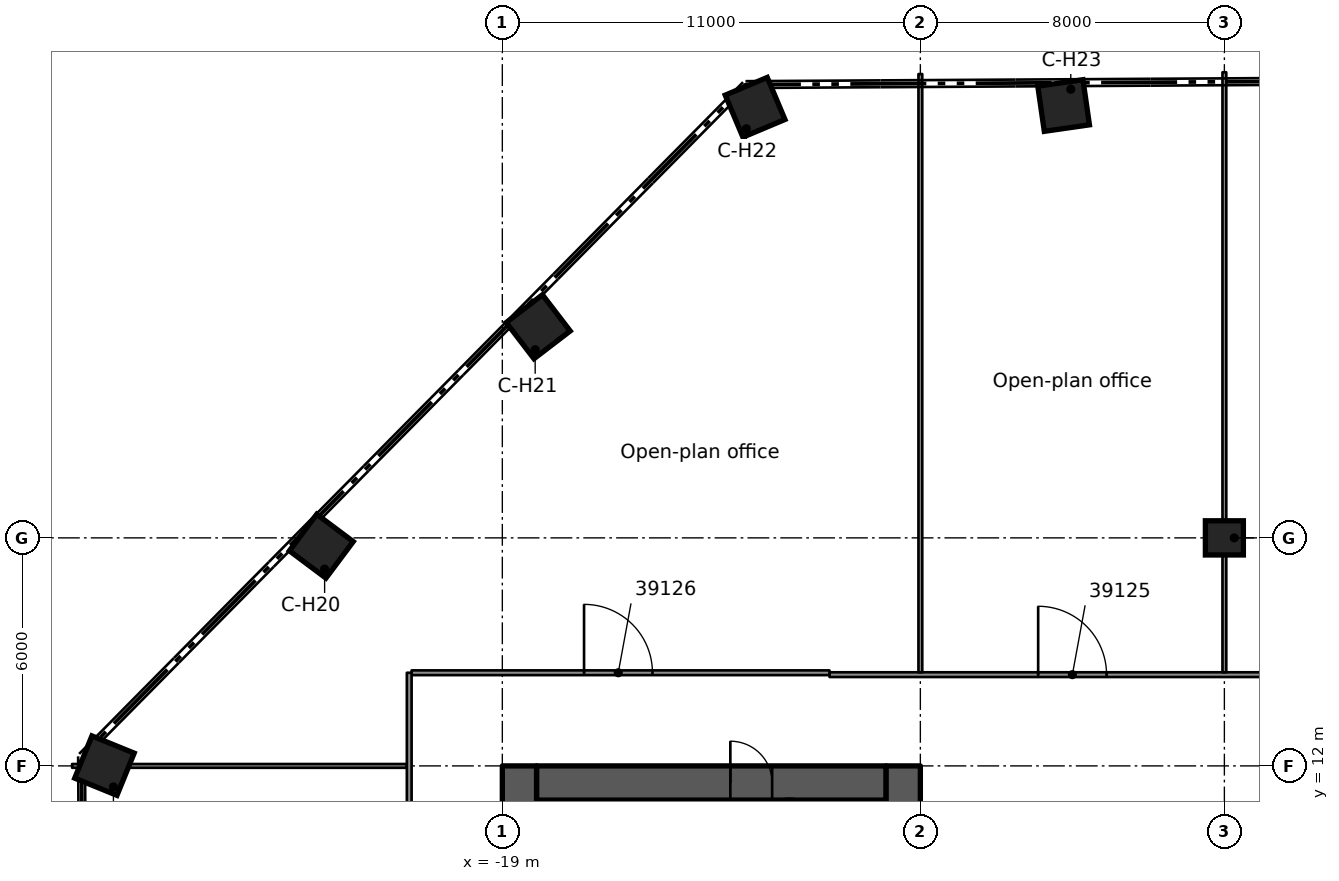
"""IFC4 building model, lengths in metres.
Left out: names, types, materials, properties, quantities, classifications, styles, units other than length and angle.
Written with IfcOpenShell. Run it as: python <this file> out.ifc"""

import sys

from ifc_helpers import new_model, si_unit, direction, frame, frame_2d, origin, origin_2d, place, context, subcontext, project, spatial, rectangle, extrude, element, fill, save


model = new_model("IFC4")
c1 = context("Model", 3, precision=1e-05, world=origin(), true_north=direction((0.0, 1.0)))
c2 = subcontext(c1, "Body", "Model", "MODEL_VIEW")
j1 = project(units=[si_unit("LENGTHUNIT", "METRE"), si_unit("PLANEANGLEUNIT", "RADIAN")], contexts=[c1])
p1 = place(None, origin())
s1 = spatial("IfcSite", under=j1, at=p1, CompositionType="ELEMENT")
p2 = place(p1, origin())
s2 = spatial("IfcBuilding", under=s1, at=p2, CompositionType="ELEMENT")
p3 = place(p2, frame((0.0, 0.0, 192.1)))
s3 = spatial("IfcBuildingStorey", under=s2, at=p3, CompositionType="ELEMENT", Elevation=192.1)
p4 = place(p3, frame((-18.1, 11.55, 0.0), z_axis=(0.0, 0.0, 1.0), x_axis=(1.0, 0.0, 0.0)))
e1 = element("IfcWall", 1, at=p4, inside=s3, PredefinedType="SHEAR", context=c2, shape_type="SweptSolid", body=[
    extrude(rectangle(XDim=9.2, YDim=0.9, at=frame_2d((4.6, 0.0))), origin(), (0.0, 0.0, 1.0), 3.5),
])
p5 = place(p4, frame((5.1, 0.0, 0.0)))
e2 = element("IfcOpeningElement", 2, at=p5, cuts=e1, PredefinedType="OPENING", context=c2, shape_type="SweptSolid", body=[
    extrude(rectangle(XDim=1.1, YDim=2.1, at=frame_2d((0.55, 1.05))), frame((0.0, 0.46, 0.0), z_axis=(0.0, -1.0, 0.0), x_axis=(1.0, 0.0, 0.0)), (0.0, 0.0, 1.0), 0.92),
])
p6 = place(p3, frame((-18.55, -12.0, 0.0), z_axis=(0.0, 0.0, 1.0), x_axis=(0.0, 1.0, 0.0)))
e3 = element("IfcWall", 3, at=p6, inside=s3, PredefinedType="SHEAR", context=c2, shape_type="SweptSolid", body=[
    extrude(rectangle(XDim=24.0, YDim=0.9, at=frame_2d((12.0, 0.0))), origin(), (0.0, 0.0, 1.0), 3.5),
])
p7 = place(p6, frame((10.1, 0.0, 0.0)))
e4 = element("IfcOpeningElement", 4, at=p7, cuts=e3, PredefinedType="OPENING", context=c2, shape_type="SweptSolid", body=[
    extrude(rectangle(XDim=1.8, YDim=2.1, at=frame_2d((0.9, 1.05))), frame((0.0, 0.46, 0.0), z_axis=(0.0, -1.0, 0.0), x_axis=(1.0, 0.0, 0.0)), (0.0, 0.0, 1.0), 0.92),
])
p8 = place(p3, frame((-8.45, -12.0, 0.0), z_axis=(0.0, 0.0, 1.0), x_axis=(0.0, 1.0, 0.0)))
e5 = element("IfcWall", 5, at=p8, inside=s3, PredefinedType="SHEAR", context=c2, shape_type="SweptSolid", body=[
    extrude(rectangle(XDim=24.0, YDim=0.9, at=frame_2d((12.0, 0.0))), origin(), (0.0, 0.0, 1.0), 3.5),
])
p9 = place(p8, frame((9.6, 0.0, 0.0)))
e6 = element("IfcOpeningElement", 6, at=p9, cuts=e5, PredefinedType="OPENING", context=c2, shape_type="SweptSolid", body=[
    extrude(rectangle(XDim=1.8, YDim=2.1, at=frame_2d((0.9, 1.05))), frame((0.0, 0.46, 0.0), z_axis=(0.0, -1.0, 0.0), x_axis=(1.0, 0.0, 0.0)), (0.0, 0.0, 1.0), 0.92),
])
p10 = place(p8, frame((19.65, 0.0, 0.0)))
e7 = element("IfcOpeningElement", 7, at=p10, cuts=e5, PredefinedType="OPENING", context=c2, shape_type="SweptSolid", body=[
    extrude(rectangle(XDim=1.1, YDim=2.1, at=frame_2d((0.55, 1.05))), frame((0.0, 0.46, 0.0), z_axis=(0.0, -1.0, 0.0), x_axis=(1.0, 0.0, 0.0)), (0.0, 0.0, 1.0), 0.92),
])
p11 = place(p8, frame((2.2, 0.0, 0.0)))
e8 = element("IfcOpeningElement", 8, at=p11, cuts=e5, PredefinedType="OPENING", context=c2, shape_type="SweptSolid", body=[
    extrude(rectangle(XDim=0.8, YDim=2.1, at=frame_2d((0.4, 1.05))), frame((0.0, 0.46, 0.0), z_axis=(0.0, -1.0, 0.0), x_axis=(1.0, 0.0, 0.0)), (0.0, 0.0, 1.0), 0.92),
])
for number, where, z_axis, x_axis in (
    (9, (-29.47, 12.007, 0.0), (0.0, 0.0, 1.0), (-0.926, 0.377, 0.0)),
    (10, (-23.763, 17.781, 0.0), (0.0, 0.0, 1.0), (-0.801, 0.599, 0.0)),
    (11, (-18.056, 23.555, 0.0), (0.0, 0.0, 1.0), (-0.608, 0.794, 0.0)),
    (12, (-12.349, 29.329, 0.0), (0.0, 0.0, 1.0), (-0.388, 0.922, 0.0)),
    (13, (-4.23, 29.376, 0.0), (0.0, 0.0, 1.0), (-0.143, 0.99, 0.0)),
):
    element("IfcColumn", number, at=place(p3, frame(where, z_axis=z_axis, x_axis=x_axis)), inside=s3, PredefinedType="COLUMN", context=c2, shape_type="SweptSolid", body=[
        extrude(rectangle(XDim=1.2, YDim=1.2, at=origin_2d()), origin(), (0.0, 0.0, 1.0), 3.5),
    ])
p12 = place(p3, frame((0.0, 18.0, 0.0), z_axis=(0.0, 0.0, 1.0), x_axis=(1.0, 0.0, 0.0)))
e14 = element("IfcColumn", 14, at=p12, inside=s3, PredefinedType="COLUMN", context=c2, shape_type="SweptSolid", body=[
    extrude(rectangle(XDim=1.0, YDim=0.9, at=origin_2d()), origin(), (0.0, 0.0, 1.0), 3.5),
])
p13 = place(p3, frame((-11.44, 6.975, 0.0), z_axis=(0.0, 0.0, 1.0), x_axis=(0.0, 1.0, 0.0)))
e15 = element("IfcWall", 15, at=p13, inside=s3, PredefinedType="SOLIDWALL", context=c2, shape_type="SweptSolid", body=[
    extrude(rectangle(XDim=4.125, YDim=0.2, at=frame_2d((2.062, 0.0))), origin(), (0.0, 0.0, 1.0), 3.08),
])
p14 = place(p13, frame((2.1, 0.0, 0.0)))
e16 = element("IfcOpeningElement", 16, at=p14, cuts=e15, PredefinedType="OPENING", context=c2, shape_type="SweptSolid", body=[
    extrude(rectangle(XDim=1.1, YDim=2.1, at=frame_2d((0.55, 1.05))), frame((0.0, 0.11, 0.0), z_axis=(0.0, -1.0, 0.0), x_axis=(1.0, 0.0, 0.0)), (0.0, 0.0, 1.0), 0.22),
])
p15 = place(p3, frame((-30.321, 12.0, 0.0), z_axis=(0.0, 0.0, 1.0), x_axis=(1.0, 0.0, 0.0)))
e17 = element("IfcWall", 17, at=p15, inside=s3, PredefinedType="PARTITIONING", context=c2, shape_type="SweptSolid", body=[
    extrude(rectangle(XDim=8.809, YDim=0.1, at=frame_2d((4.405, 0.0))), origin(), (0.0, 0.0, 1.0), 3.06),
])
p16 = place(p3, frame((-10.39, 14.401, 0.0), z_axis=(0.0, 0.0, 1.0), x_axis=(1.0, 0.0, 0.0)))
e18 = element("IfcWall", 18, at=p16, inside=s3, PredefinedType="PARTITIONING", context=c2, shape_type="SweptSolid", body=[
    extrude(rectangle(XDim=20.781, YDim=0.125, at=frame_2d((10.391, 0.0))), origin(), (0.0, 0.0, 1.0), 3.06),
])
p17 = place(p16, frame((18.99, 0.0, 0.0)))
e19 = element("IfcOpeningElement", 19, at=p17, cuts=e18, PredefinedType="OPENING", context=c2, shape_type="SweptSolid", body=[
    extrude(rectangle(XDim=1.1, YDim=2.1, at=frame_2d((0.55, 1.05))), frame((0.0, 0.073, 0.0), z_axis=(0.0, -1.0, 0.0), x_axis=(1.0, 0.0, 0.0)), (0.0, 0.0, 1.0), 0.145),
])
p18 = place(p16, frame((13.49, 0.0, 0.0)))
e20 = element("IfcOpeningElement", 20, at=p18, cuts=e18, PredefinedType="OPENING", context=c2, shape_type="SweptSolid", body=[
    extrude(rectangle(XDim=1.8, YDim=2.1, at=frame_2d((0.9, 1.05))), frame((0.0, 0.073, 0.0), z_axis=(0.0, -1.0, 0.0), x_axis=(1.0, 0.0, 0.0)), (0.0, 0.0, 1.0), 0.145),
])
p19 = place(p16, frame((5.49, 0.0, 0.0)))
e21 = element("IfcOpeningElement", 21, at=p19, cuts=e18, PredefinedType="OPENING", context=c2, shape_type="SweptSolid", body=[
    extrude(rectangle(XDim=1.8, YDim=2.1, at=frame_2d((0.9, 1.05))), frame((0.0, 0.073, 0.0), z_axis=(0.0, -1.0, 0.0), x_axis=(1.0, 0.0, 0.0)), (0.0, 0.0, 1.0), 0.145),
])
p20 = place(p3, frame((-21.387, 14.451, 0.0), z_axis=(0.0, 0.0, 1.0), x_axis=(1.0, 0.0, 0.0)))
e22 = element("IfcWall", 22, at=p20, inside=s3, PredefinedType="PARTITIONING", context=c2, shape_type="SweptSolid", body=[
    extrude(rectangle(XDim=10.996, YDim=0.125, at=frame_2d((5.498, 0.0))), origin(), (0.0, 0.0, 1.0), 3.06),
])
p21 = place(p20, frame((4.538, 0.0, 0.0)))
e23 = element("IfcOpeningElement", 23, at=p21, cuts=e22, PredefinedType="OPENING", context=c2, shape_type="SweptSolid", body=[
    extrude(rectangle(XDim=1.8, YDim=2.1, at=frame_2d((0.9, 1.05))), frame((0.0, 0.073, 0.0), z_axis=(0.0, -1.0, 0.0), x_axis=(1.0, 0.0, 0.0)), (0.0, 0.0, 1.0), 0.145),
])
p22 = place(p3, frame((0.0, 14.463, 0.0), z_axis=(0.0, 0.0, 1.0), x_axis=(0.0, 1.0, 0.0)))
e24 = element("IfcWall", 24, at=p22, inside=s3, PredefinedType="PARTITIONING", context=c2, shape_type="SweptSolid", body=[
    extrude(rectangle(XDim=15.788, YDim=0.1, at=frame_2d((7.894, 0.0))), origin(), (0.0, 0.0, 1.0), 3.06),
])
p23 = place(p3, frame((-8.0, 14.463, 0.0), z_axis=(0.0, 0.0, 1.0), x_axis=(0.0, 1.0, 0.0)))
e25 = element("IfcWall", 25, at=p23, inside=s3, PredefinedType="PARTITIONING", context=c2, shape_type="SweptSolid", body=[
    extrude(rectangle(XDim=15.741, YDim=0.1, at=frame_2d((7.871, 0.0))), origin(), (0.0, 0.0, 1.0), 3.06),
])
p24 = place(p3, frame((-21.45, -14.451, 0.0), z_axis=(0.0, 0.0, 1.0), x_axis=(0.0, 1.0, 0.0)))
e26 = element("IfcWall", 26, at=p24, inside=s3, PredefinedType="PARTITIONING", context=c2, shape_type="SweptSolid", body=[
    extrude(rectangle(XDim=28.902, YDim=0.125, at=frame_2d((14.451, 0.0))), origin(), (0.0, 0.0, 1.0), 3.06),
])
p25 = place(p24, frame((0.6, 0.0, 0.0)))
e27 = element("IfcOpeningElement", 27, at=p25, cuts=e26, PredefinedType="OPENING", context=c2, shape_type="SweptSolid", body=[
    extrude(rectangle(XDim=1.1, YDim=2.1, at=frame_2d((0.55, 1.05))), frame((0.0, 0.073, 0.0), z_axis=(0.0, -1.0, 0.0), x_axis=(1.0, 0.0, 0.0)), (0.0, 0.0, 1.0), 0.145),
])
p26 = place(p24, frame((13.551, 0.0, 0.0)))
e28 = element("IfcOpeningElement", 28, at=p26, cuts=e26, PredefinedType="OPENING", context=c2, shape_type="SweptSolid", body=[
    extrude(rectangle(XDim=1.8, YDim=2.1, at=frame_2d((0.9, 1.05))), frame((0.0, 0.073, 0.0), z_axis=(0.0, -1.0, 0.0), x_axis=(1.0, 0.0, 0.0)), (0.0, 0.0, 1.0), 0.145),
])
p27 = place(p5, origin())
e29 = element("IfcDoor", 29, at=p27, inside=s3, OperationType="SINGLE_SWING_RIGHT", PredefinedType="DOOR", context=c2, shape_type="SweptSolid", body=[
    extrude(rectangle(XDim=1.1, YDim=2.1, at=frame_2d((0.55, 1.05))), frame((0.0, 0.025, 0.0), z_axis=(0.0, -1.0, 0.0), x_axis=(1.0, 0.0, 0.0)), (0.0, 0.0, 1.0), 0.05),
])
fill(e2, e29)
p28 = place(p19, origin())
e30 = element("IfcDoor", 30, at=p28, inside=s3, OperationType="DOUBLE_DOOR_SINGLE_SWING", PredefinedType="DOOR", context=c2, shape_type="SweptSolid", body=[
    extrude(rectangle(XDim=1.8, YDim=2.1, at=frame_2d((0.9, 1.05))), frame((0.0, 0.025, 0.0), z_axis=(0.0, -1.0, 0.0), x_axis=(1.0, 0.0, 0.0)), (0.0, 0.0, 1.0), 0.05),
])
fill(e21, e30)
p29 = place(p21, origin())
e31 = element("IfcDoor", 31, at=p29, inside=s3, OperationType="DOUBLE_DOOR_SINGLE_SWING", PredefinedType="DOOR", context=c2, shape_type="SweptSolid", body=[
    extrude(rectangle(XDim=1.8, YDim=2.1, at=frame_2d((0.9, 1.05))), frame((0.0, 0.025, 0.0), z_axis=(0.0, -1.0, 0.0), x_axis=(1.0, 0.0, 0.0)), (0.0, 0.0, 1.0), 0.05),
])
fill(e23, e31)
save(model, sys.argv[1])
